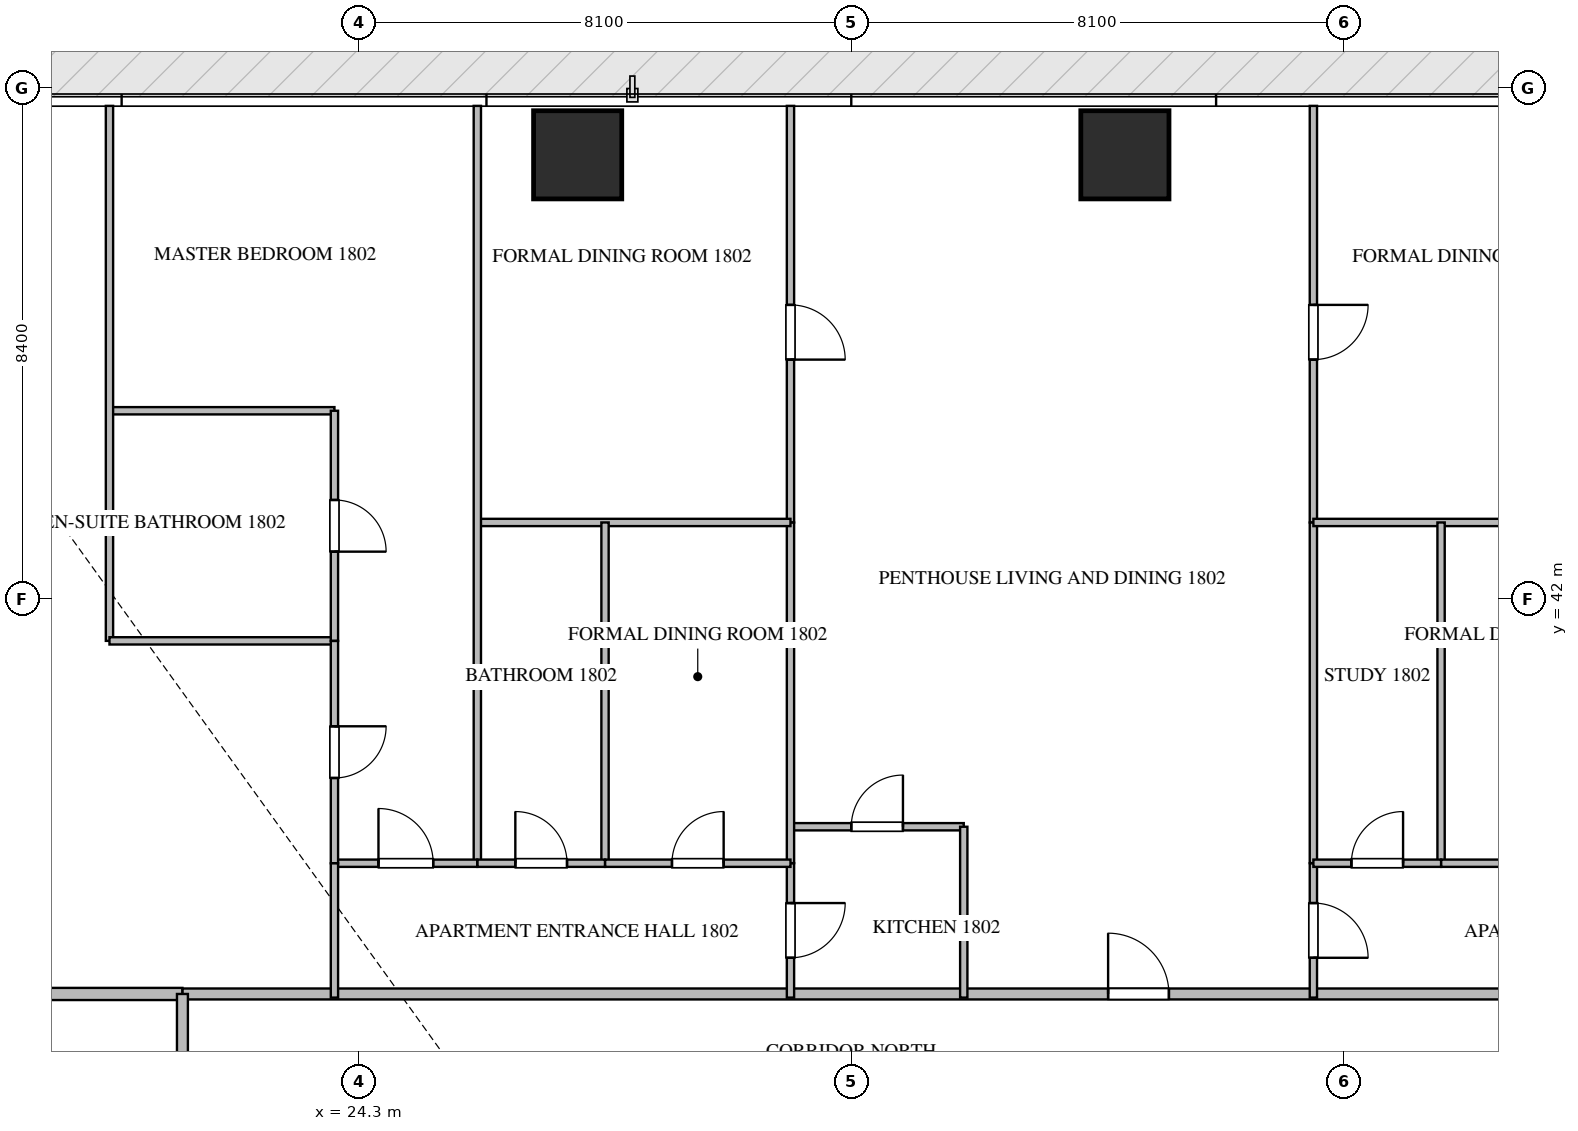
"""IFC4 building model, lengths in metres.
Left out: names, types, materials, properties, quantities, classifications, styles, units other than length and angle.
Written with IfcOpenShell. Run it as: python <this file> out.ifc"""

import sys

from ifc_helpers import new_model, si_unit, direction, frame, frame_2d, origin, origin_2d, place, context, subcontext, project, spatial, rectangle, extrude, source, transform, mapped, element, fill, save


model = new_model("IFC4")
c1 = context("Model", 3, precision=1e-05, world=origin(), true_north=direction((0.0, 1.0)))
c2 = subcontext(c1, "Body", "Model", "MODEL_VIEW")
j1 = project(units=[si_unit("LENGTHUNIT", "METRE"), si_unit("PLANEANGLEUNIT", "RADIAN")], contexts=[c1])
p1 = place(None, origin())
s1 = spatial("IfcSite", under=j1, at=p1, CompositionType="ELEMENT")
p2 = place(p1, origin())
s2 = spatial("IfcBuilding", under=s1, at=p2, CompositionType="ELEMENT")
p3 = place(p2, frame((0.0, 0.0, 75.45)))
s3 = spatial("IfcBuildingStorey", under=s2, at=p3, CompositionType="ELEMENT", Elevation=75.45)
m1 = source(origin(), c2, "Body", "SweptSolid", [
    extrude(rectangle(XDim=1.45, YDim=1.45, at=origin_2d()), origin(), (0.0, 0.0, 1.0), 3.75),
])
for number, where, z_axis, x_axis in (
    (1, (27.9, 49.3, -0.26), (0.0, 0.0, 1.0), (1.0, 0.0, 0.0)),
    (2, (36.9, 49.3, -0.26), (0.0, 0.0, 1.0), (1.0, 0.0, 0.0)),
):
    element("IfcColumn", number, at=place(p3, frame(where, z_axis=z_axis, x_axis=x_axis)), inside=s3, PredefinedType="COLUMN", context=c2, shape_type="MappedRepresentation", body=[
        mapped(m1, transform((0.0, 0.0, 0.0), scale=1.0)),
    ])
p4 = place(p3, frame((6.082, 35.5, 0.0), z_axis=(0.0, 0.0, 1.0), x_axis=(1.0, 0.0, 0.0)))
e3 = element("IfcWall", 3, at=p4, inside=s3, PredefinedType="PARTITIONING", context=c2, shape_type="SweptSolid", body=[
    extrude(rectangle(XDim=15.318, YDim=0.2, at=frame_2d((7.659, 0.0))), origin(), (0.0, 0.0, 1.0), 3.49),
])
p5 = place(p3, frame((21.402, 35.5, 0.0), z_axis=(0.0, 0.0, 1.0), x_axis=(1.0, 0.0, 0.0)))
e4 = element("IfcWall", 4, at=p5, inside=s3, PredefinedType="PARTITIONING", context=c2, shape_type="SweptSolid", body=[
    extrude(rectangle(XDim=21.996, YDim=0.18, at=frame_2d((10.998, 0.0))), origin(), (0.0, 0.0, 1.0), 3.49),
])
p6 = place(p5, frame((15.222, 0.0, 0.0)))
e5 = element("IfcOpeningElement", 5, at=p6, cuts=e4, PredefinedType="OPENING", context=c2, shape_type="SweptSolid", body=[
    extrude(rectangle(XDim=1.0, YDim=2.15, at=frame_2d((0.5, 1.075))), frame((0.0, 0.1, 0.0), z_axis=(0.0, -1.0, 0.0), x_axis=(1.0, 0.0, 0.0)), (0.0, 0.0, 1.0), 0.2),
])
p7 = place(p3, frame((21.4, 14.9, 0.0), z_axis=(0.0, 0.0, 1.0), x_axis=(0.0, 1.0, 0.0)))
e6 = element("IfcWall", 6, at=p7, inside=s3, PredefinedType="PARTITIONING", context=c2, shape_type="SweptSolid", body=[
    extrude(rectangle(XDim=20.6, YDim=0.18, at=frame_2d((10.3, 0.0))), origin(), (0.0, 0.0, 1.0), 3.49),
])
p8 = place(p7, frame((1.96, 0.0, 0.0)))
e7 = element("IfcOpeningElement", 7, at=p8, cuts=e6, PredefinedType="OPENING", context=c2, shape_type="SweptSolid", body=[
    extrude(rectangle(XDim=1.0, YDim=2.15, at=frame_2d((0.5, 1.075))), frame((0.0, 0.1, 0.0), z_axis=(0.0, -1.0, 0.0), x_axis=(1.0, 0.0, 0.0)), (0.0, 0.0, 1.0), 0.2),
])
p9 = place(p3, frame((31.4, 38.25, 0.0), z_axis=(0.0, 0.0, 1.0), x_axis=(1.0, 0.0, 0.0)))
e8 = element("IfcWall", 8, at=p9, inside=s3, PredefinedType="PARTITIONING", context=c2, shape_type="SweptSolid", body=[
    extrude(rectangle(XDim=2.85, YDim=0.12, at=frame_2d((1.425, 0.0))), origin(), (0.0, 0.0, 1.0), 3.49),
])
p10 = place(p9, frame((1.0, 0.0, 0.0)))
e9 = element("IfcOpeningElement", 9, at=p10, cuts=e8, PredefinedType="OPENING", context=c2, shape_type="SweptSolid", body=[
    extrude(rectangle(XDim=0.85, YDim=2.1, at=frame_2d((0.425, 1.05))), frame((0.0, 0.07, 0.0), z_axis=(0.0, -1.0, 0.0), x_axis=(1.0, 0.0, 0.0)), (0.0, 0.0, 1.0), 0.14),
])
p11 = place(p3, frame((34.25, 38.25, 0.0), z_axis=(0.0, 0.0, 1.0), x_axis=(0.0, -1.0, 0.0)))
e10 = element("IfcWall", 10, at=p11, inside=s3, PredefinedType="PARTITIONING", context=c2, shape_type="SweptSolid", body=[
    extrude(rectangle(XDim=2.81, YDim=0.12, at=frame_2d((1.405, 0.0))), origin(), (0.0, 0.0, 1.0), 3.49),
])
p12 = place(p3, frame((31.4, 37.65, 0.0), z_axis=(0.0, 0.0, 1.0), x_axis=(0.0, -1.0, 0.0)))
e11 = element("IfcWall", 11, at=p12, inside=s3, PredefinedType="PARTITIONING", context=c2, shape_type="SweptSolid", body=[
    extrude(rectangle(XDim=2.21, YDim=0.12, at=frame_2d((1.105, 0.0))), origin(), (0.0, 0.0, 1.0), 3.49),
])
p13 = place(p12, frame((0.655, 0.0, 0.0)))
e12 = element("IfcOpeningElement", 12, at=p13, cuts=e11, PredefinedType="OPENING", context=c2, shape_type="SweptSolid", body=[
    extrude(rectangle(XDim=0.9, YDim=2.1, at=frame_2d((0.45, 1.05))), frame((0.0, 0.07, 0.0), z_axis=(0.0, -1.0, 0.0), x_axis=(1.0, 0.0, 0.0)), (0.0, 0.0, 1.0), 0.14),
])
p14 = place(p3, frame((31.4, 50.105, 0.0), z_axis=(0.0, 0.0, 1.0), x_axis=(0.0, -1.0, 0.0)))
e13 = element("IfcWall", 13, at=p14, inside=s3, PredefinedType="PARTITIONING", context=c2, shape_type="SweptSolid", body=[
    extrude(rectangle(XDim=6.851, YDim=0.12, at=frame_2d((3.426, 0.0))), origin(), (0.0, 0.0, 1.0), 3.49),
])
p15 = place(p14, frame((3.273, 0.0, 0.0)))
e14 = element("IfcOpeningElement", 14, at=p15, cuts=e13, PredefinedType="OPENING", context=c2, shape_type="SweptSolid", body=[
    extrude(rectangle(XDim=0.9, YDim=2.1, at=frame_2d((0.45, 1.05))), frame((0.0, 0.07, 0.0), z_axis=(0.0, -1.0, 0.0), x_axis=(1.0, 0.0, 0.0)), (0.0, 0.0, 1.0), 0.14),
])
p16 = place(p3, frame((31.4, 43.252, 0.0), z_axis=(0.0, 0.0, 1.0), x_axis=(0.0, -1.0, 0.0)))
e15 = element("IfcWall", 15, at=p16, inside=s3, PredefinedType="PARTITIONING", context=c2, shape_type="SweptSolid", body=[
    extrude(rectangle(XDim=5.6, YDim=0.12, at=frame_2d((2.8, 0.0))), origin(), (0.0, 0.0, 1.0), 3.49),
])
p17 = place(p3, frame((26.25, 43.254, 0.0), z_axis=(0.0, 0.0, 1.0), x_axis=(1.0, 0.0, 0.0)))
e16 = element("IfcWall", 16, at=p17, inside=s3, PredefinedType="PARTITIONING", context=c2, shape_type="SweptSolid", body=[
    extrude(rectangle(XDim=5.15, YDim=0.12, at=frame_2d((2.575, 0.0))), origin(), (0.0, 0.0, 1.0), 3.49),
])
p18 = place(p3, frame((26.25, 50.105, 0.0), z_axis=(0.0, 0.0, 1.0), x_axis=(0.0, -1.0, 0.0)))
e17 = element("IfcWall", 17, at=p18, inside=s3, PredefinedType="PARTITIONING", context=c2, shape_type="SweptSolid", body=[
    extrude(rectangle(XDim=12.455, YDim=0.12, at=frame_2d((6.228, 0.0))), origin(), (0.0, 0.0, 1.0), 3.49),
])
p19 = place(p3, frame((28.35, 43.254, 0.0), z_axis=(0.0, 0.0, 1.0), x_axis=(0.0, -1.0, 0.0)))
e18 = element("IfcWall", 18, at=p19, inside=s3, PredefinedType="PARTITIONING", context=c2, shape_type="SweptSolid", body=[
    extrude(rectangle(XDim=5.604, YDim=0.12, at=frame_2d((2.802, 0.0))), origin(), (0.0, 0.0, 1.0), 3.49),
])
p20 = place(p3, frame((26.25, 37.65, 0.0), z_axis=(0.0, 0.0, 1.0), x_axis=(1.0, 0.0, 0.0)))
e19 = element("IfcWall", 19, at=p20, inside=s3, PredefinedType="PARTITIONING", context=c2, shape_type="SweptSolid", body=[
    extrude(rectangle(XDim=2.1, YDim=0.12, at=frame_2d((1.05, 0.0))), origin(), (0.0, 0.0, 1.0), 3.49),
])
p21 = place(p20, frame((0.625, 0.0, 0.0)))
e20 = element("IfcOpeningElement", 20, at=p21, cuts=e19, PredefinedType="OPENING", context=c2, shape_type="SweptSolid", body=[
    extrude(rectangle(XDim=0.85, YDim=2.1, at=frame_2d((0.425, 1.05))), frame((0.0, 0.07, 0.0), z_axis=(0.0, -1.0, 0.0), x_axis=(1.0, 0.0, 0.0)), (0.0, 0.0, 1.0), 0.14),
])
p22 = place(p3, frame((28.352, 37.65, 0.0), z_axis=(0.0, 0.0, 1.0), x_axis=(1.0, 0.0, 0.0)))
e21 = element("IfcWall", 21, at=p22, inside=s3, PredefinedType="PARTITIONING", context=c2, shape_type="SweptSolid", body=[
    extrude(rectangle(XDim=3.048, YDim=0.12, at=frame_2d((1.524, 0.0))), origin(), (0.0, 0.0, 1.0), 3.49),
])
p23 = place(p22, frame((1.099, 0.0, 0.0)))
e22 = element("IfcOpeningElement", 22, at=p23, cuts=e21, PredefinedType="OPENING", context=c2, shape_type="SweptSolid", body=[
    extrude(rectangle(XDim=0.85, YDim=2.1, at=frame_2d((0.425, 1.05))), frame((0.0, 0.07, 0.0), z_axis=(0.0, -1.0, 0.0), x_axis=(1.0, 0.0, 0.0)), (0.0, 0.0, 1.0), 0.14),
])
p24 = place(p3, frame((23.9, 37.65, 0.0), z_axis=(0.0, 0.0, 1.0), x_axis=(1.0, 0.0, 0.0)))
e23 = element("IfcWall", 23, at=p24, inside=s3, PredefinedType="PARTITIONING", context=c2, shape_type="SweptSolid", body=[
    extrude(rectangle(XDim=2.348, YDim=0.12, at=frame_2d((1.174, 0.0))), origin(), (0.0, 0.0, 1.0), 3.49),
])
p25 = place(p24, frame((0.724, 0.0, 0.0)))
e24 = element("IfcOpeningElement", 24, at=p25, cuts=e23, PredefinedType="OPENING", context=c2, shape_type="SweptSolid", body=[
    extrude(rectangle(XDim=0.9, YDim=2.1, at=frame_2d((0.45, 1.05))), frame((0.0, 0.07, 0.0), z_axis=(0.0, -1.0, 0.0), x_axis=(1.0, 0.0, 0.0)), (0.0, 0.0, 1.0), 0.14),
])
p26 = place(p3, frame((20.2, 45.091, 0.0), z_axis=(0.0, 0.0, 1.0), x_axis=(1.0, 0.0, 0.0)))
e25 = element("IfcWall", 25, at=p26, inside=s3, PredefinedType="PARTITIONING", context=c2, shape_type="SweptSolid", body=[
    extrude(rectangle(XDim=3.7, YDim=0.12, at=frame_2d((1.85, 0.0))), origin(), (0.0, 0.0, 1.0), 3.49),
])
p27 = place(p3, frame((20.2, 50.105, 0.0), z_axis=(0.0, 0.0, 1.0), x_axis=(0.0, -1.0, 0.0)))
e26 = element("IfcWall", 26, at=p27, inside=s3, PredefinedType="PARTITIONING", context=c2, shape_type="SweptSolid", body=[
    extrude(rectangle(XDim=8.798, YDim=0.12, at=frame_2d((4.399, 0.0))), origin(), (0.0, 0.0, 1.0), 3.49),
])
p28 = place(p3, frame((20.2, 41.307, 0.0), z_axis=(0.0, 0.0, 1.0), x_axis=(1.0, 0.0, 0.0)))
e27 = element("IfcWall", 27, at=p28, inside=s3, PredefinedType="PARTITIONING", context=c2, shape_type="SweptSolid", body=[
    extrude(rectangle(XDim=3.7, YDim=0.12, at=frame_2d((1.85, 0.0))), origin(), (0.0, 0.0, 1.0), 3.49),
])
p29 = place(p3, frame((23.9, 45.091, 0.0), z_axis=(0.0, 0.0, 1.0), x_axis=(0.0, -1.0, 0.0)))
e28 = element("IfcWall", 28, at=p29, inside=s3, PredefinedType="PARTITIONING", context=c2, shape_type="SweptSolid", body=[
    extrude(rectangle(XDim=3.784, YDim=0.12, at=frame_2d((1.892, 0.0))), origin(), (0.0, 0.0, 1.0), 3.49),
])
p30 = place(p29, frame((1.467, 0.0, 0.0)))
e29 = element("IfcOpeningElement", 29, at=p30, cuts=e28, PredefinedType="OPENING", context=c2, shape_type="SweptSolid", body=[
    extrude(rectangle(XDim=0.85, YDim=2.1, at=frame_2d((0.425, 1.05))), frame((0.0, 0.07, 0.0), z_axis=(0.0, -1.0, 0.0), x_axis=(1.0, 0.0, 0.0)), (0.0, 0.0, 1.0), 0.14),
])
p31 = place(p3, frame((23.9, 41.305, 0.0), z_axis=(0.0, 0.0, 1.0), x_axis=(0.0, -1.0, 0.0)))
e30 = element("IfcWall", 30, at=p31, inside=s3, PredefinedType="PARTITIONING", context=c2, shape_type="SweptSolid", body=[
    extrude(rectangle(XDim=3.655, YDim=0.12, at=frame_2d((1.828, 0.0))), origin(), (0.0, 0.0, 1.0), 3.49),
])
p32 = place(p31, frame((1.403, 0.0, 0.0)))
e31 = element("IfcOpeningElement", 31, at=p32, cuts=e30, PredefinedType="OPENING", context=c2, shape_type="SweptSolid", body=[
    extrude(rectangle(XDim=0.85, YDim=2.1, at=frame_2d((0.425, 1.05))), frame((0.0, 0.07, 0.0), z_axis=(0.0, -1.0, 0.0), x_axis=(1.0, 0.0, 0.0)), (0.0, 0.0, 1.0), 0.14),
])
p33 = place(p3, frame((23.9, 37.648, 0.0), z_axis=(0.0, 0.0, 1.0), x_axis=(0.0, -1.0, 0.0)))
e32 = element("IfcWall", 32, at=p33, inside=s3, PredefinedType="PARTITIONING", context=c2, shape_type="SweptSolid", body=[
    extrude(rectangle(XDim=2.208, YDim=0.12, at=frame_2d((1.104, 0.0))), origin(), (0.0, 0.0, 1.0), 3.49),
])
p34 = place(p3, frame((40.0, 37.65, 0.0), z_axis=(0.0, 0.0, 1.0), x_axis=(0.0, -1.0, 0.0)))
e33 = element("IfcWall", 33, at=p34, inside=s3, PredefinedType="PARTITIONING", context=c2, shape_type="SweptSolid", body=[
    extrude(rectangle(XDim=2.21, YDim=0.12, at=frame_2d((1.105, 0.0))), origin(), (0.0, 0.0, 1.0), 3.49),
])
p35 = place(p34, frame((0.655, 0.0, 0.0)))
e34 = element("IfcOpeningElement", 34, at=p35, cuts=e33, PredefinedType="OPENING", context=c2, shape_type="SweptSolid", body=[
    extrude(rectangle(XDim=0.9, YDim=2.1, at=frame_2d((0.45, 1.05))), frame((0.0, 0.07, 0.0), z_axis=(0.0, -1.0, 0.0), x_axis=(1.0, 0.0, 0.0)), (0.0, 0.0, 1.0), 0.14),
])
p36 = place(p3, frame((40.0, 50.105, 0.0), z_axis=(0.0, 0.0, 1.0), x_axis=(0.0, -1.0, 0.0)))
e35 = element("IfcWall", 35, at=p36, inside=s3, PredefinedType="PARTITIONING", context=c2, shape_type="SweptSolid", body=[
    extrude(rectangle(XDim=6.851, YDim=0.12, at=frame_2d((3.426, 0.0))), origin(), (0.0, 0.0, 1.0), 3.49),
])
p37 = place(p36, frame((3.273, 0.0, 0.0)))
e36 = element("IfcOpeningElement", 36, at=p37, cuts=e35, PredefinedType="OPENING", context=c2, shape_type="SweptSolid", body=[
    extrude(rectangle(XDim=0.9, YDim=2.1, at=frame_2d((0.45, 1.05))), frame((0.0, 0.07, 0.0), z_axis=(0.0, -1.0, 0.0), x_axis=(1.0, 0.0, 0.0)), (0.0, 0.0, 1.0), 0.14),
])
p38 = place(p3, frame((40.0, 43.252, 0.0), z_axis=(0.0, 0.0, 1.0), x_axis=(0.0, -1.0, 0.0)))
e37 = element("IfcWall", 37, at=p38, inside=s3, PredefinedType="PARTITIONING", context=c2, shape_type="SweptSolid", body=[
    extrude(rectangle(XDim=5.6, YDim=0.12, at=frame_2d((2.8, 0.0))), origin(), (0.0, 0.0, 1.0), 3.49),
])
p39 = place(p3, frame((40.0, 43.254, 0.0), z_axis=(0.0, 0.0, 1.0), x_axis=(1.0, 0.0, 0.0)))
e38 = element("IfcWall", 38, at=p39, inside=s3, PredefinedType="PARTITIONING", context=c2, shape_type="SweptSolid", body=[
    extrude(rectangle(XDim=5.15, YDim=0.12, at=frame_2d((2.575, 0.0))), origin(), (0.0, 0.0, 1.0), 3.49),
])
p40 = place(p3, frame((42.1, 43.254, 0.0), z_axis=(0.0, 0.0, 1.0), x_axis=(0.0, -1.0, 0.0)))
e39 = element("IfcWall", 39, at=p40, inside=s3, PredefinedType="PARTITIONING", context=c2, shape_type="SweptSolid", body=[
    extrude(rectangle(XDim=5.604, YDim=0.12, at=frame_2d((2.802, 0.0))), origin(), (0.0, 0.0, 1.0), 3.49),
])
p41 = place(p3, frame((40.0, 37.65, 0.0), z_axis=(0.0, 0.0, 1.0), x_axis=(1.0, 0.0, 0.0)))
e40 = element("IfcWall", 40, at=p41, inside=s3, PredefinedType="PARTITIONING", context=c2, shape_type="SweptSolid", body=[
    extrude(rectangle(XDim=2.1, YDim=0.12, at=frame_2d((1.05, 0.0))), origin(), (0.0, 0.0, 1.0), 3.49),
])
p42 = place(p41, frame((0.625, 0.0, 0.0)))
e41 = element("IfcOpeningElement", 41, at=p42, cuts=e40, PredefinedType="OPENING", context=c2, shape_type="SweptSolid", body=[
    extrude(rectangle(XDim=0.85, YDim=2.1, at=frame_2d((0.425, 1.05))), frame((0.0, 0.07, 0.0), z_axis=(0.0, -1.0, 0.0), x_axis=(1.0, 0.0, 0.0)), (0.0, 0.0, 1.0), 0.14),
])
p43 = place(p3, frame((42.102, 37.65, 0.0), z_axis=(0.0, 0.0, 1.0), x_axis=(1.0, 0.0, 0.0)))
e42 = element("IfcWall", 42, at=p43, inside=s3, PredefinedType="PARTITIONING", context=c2, shape_type="SweptSolid", body=[
    extrude(rectangle(XDim=3.048, YDim=0.12, at=frame_2d((1.524, 0.0))), origin(), (0.0, 0.0, 1.0), 3.49),
])
p44 = place(p43, frame((1.099, 0.0, 0.0)))
e43 = element("IfcOpeningElement", 43, at=p44, cuts=e42, PredefinedType="OPENING", context=c2, shape_type="SweptSolid", body=[
    extrude(rectangle(XDim=0.85, YDim=2.1, at=frame_2d((0.425, 1.05))), frame((0.0, 0.07, 0.0), z_axis=(0.0, -1.0, 0.0), x_axis=(1.0, 0.0, 0.0)), (0.0, 0.0, 1.0), 0.14),
])
m2 = source(origin(), c2, "Body", "SweptSolid", [
    extrude(rectangle(XDim=1.0, YDim=2.15, at=frame_2d((0.5, 1.075))), frame((0.0, 0.025, 0.0), z_axis=(0.0, -1.0, 0.0), x_axis=(1.0, 0.0, 0.0)), (0.0, 0.0, 1.0), 0.05),
])
p45 = place(p6, origin())
e44 = element("IfcDoor", 44, at=p45, inside=s3, OperationType="SINGLE_SWING_LEFT", PredefinedType="DOOR", context=c2, shape_type="MappedRepresentation", body=[
    mapped(m2, transform((0.0, 0.0, 0.0), scale=1.0)),
])
fill(e5, e44)
m3 = source(origin(), c2, "Body", "SweptSolid", [
    extrude(rectangle(XDim=0.85, YDim=2.1, at=frame_2d((0.425, 1.05))), frame((0.0, 0.025, 0.0), z_axis=(0.0, -1.0, 0.0), x_axis=(1.0, 0.0, 0.0)), (0.0, 0.0, 1.0), 0.05),
])
p46 = place(p10, origin())
e45 = element("IfcDoor", 45, at=p46, inside=s3, OperationType="SINGLE_SWING_RIGHT", PredefinedType="DOOR", context=c2, shape_type="MappedRepresentation", body=[
    mapped(m3, transform((0.0, 0.0, 0.0), scale=1.0)),
])
fill(e9, e45)
m4 = source(origin(), c2, "Body", "SweptSolid", [
    extrude(rectangle(XDim=0.9, YDim=2.1, at=frame_2d((0.45, 1.05))), frame((0.0, 0.025, 0.0), z_axis=(0.0, -1.0, 0.0), x_axis=(1.0, 0.0, 0.0)), (0.0, 0.0, 1.0), 0.05),
])
p47 = place(p13, origin())
e46 = element("IfcDoor", 46, at=p47, inside=s3, OperationType="SINGLE_SWING_LEFT", PredefinedType="DOOR", context=c2, shape_type="MappedRepresentation", body=[
    mapped(m4, transform((0.0, 0.0, 0.0), scale=1.0)),
])
fill(e12, e46)
p48 = place(p15, origin())
e47 = element("IfcDoor", 47, at=p48, inside=s3, OperationType="SINGLE_SWING_RIGHT", PredefinedType="DOOR", context=c2, shape_type="MappedRepresentation", body=[
    mapped(m4, transform((0.0, 0.0, 0.0), scale=1.0)),
])
fill(e14, e47)
p49 = place(p21, origin())
e48 = element("IfcDoor", 48, at=p49, inside=s3, OperationType="SINGLE_SWING_LEFT", PredefinedType="DOOR", context=c2, shape_type="MappedRepresentation", body=[
    mapped(m3, transform((0.0, 0.0, 0.0), scale=1.0)),
])
fill(e20, e48)
p50 = place(p23, origin())
e49 = element("IfcDoor", 49, at=p50, inside=s3, OperationType="SINGLE_SWING_RIGHT", PredefinedType="DOOR", context=c2, shape_type="MappedRepresentation", body=[
    mapped(m3, transform((0.0, 0.0, 0.0), scale=1.0)),
])
fill(e22, e49)
p51 = place(p25, origin())
e50 = element("IfcDoor", 50, at=p51, inside=s3, OperationType="SINGLE_SWING_LEFT", PredefinedType="DOOR", context=c2, shape_type="MappedRepresentation", body=[
    mapped(m4, transform((0.0, 0.0, 0.0), scale=1.0)),
])
fill(e24, e50)
p52 = place(p30, origin())
e51 = element("IfcDoor", 51, at=p52, inside=s3, OperationType="SINGLE_SWING_RIGHT", PredefinedType="DOOR", context=c2, shape_type="MappedRepresentation", body=[
    mapped(m3, transform((0.0, 0.0, 0.0), scale=1.0)),
])
fill(e29, e51)
p53 = place(p32, origin())
e52 = element("IfcDoor", 52, at=p53, inside=s3, OperationType="SINGLE_SWING_LEFT", PredefinedType="DOOR", context=c2, shape_type="MappedRepresentation", body=[
    mapped(m3, transform((0.0, 0.0, 0.0), scale=1.0)),
])
fill(e31, e52)
p54 = place(p35, origin())
e53 = element("IfcDoor", 53, at=p54, inside=s3, OperationType="SINGLE_SWING_RIGHT", PredefinedType="DOOR", context=c2, shape_type="MappedRepresentation", body=[
    mapped(m4, transform((0.0, 0.0, 0.0), scale=1.0)),
])
fill(e34, e53)
p55 = place(p37, origin())
e54 = element("IfcDoor", 54, at=p55, inside=s3, OperationType="SINGLE_SWING_LEFT", PredefinedType="DOOR", context=c2, shape_type="MappedRepresentation", body=[
    mapped(m4, transform((0.0, 0.0, 0.0), scale=1.0)),
])
fill(e36, e54)
p56 = place(p42, origin())
e55 = element("IfcDoor", 55, at=p56, inside=s3, OperationType="SINGLE_SWING_RIGHT", PredefinedType="DOOR", context=c2, shape_type="MappedRepresentation", body=[
    mapped(m3, transform((0.0, 0.0, 0.0), scale=1.0)),
])
fill(e41, e55)
save(model, sys.argv[1])
